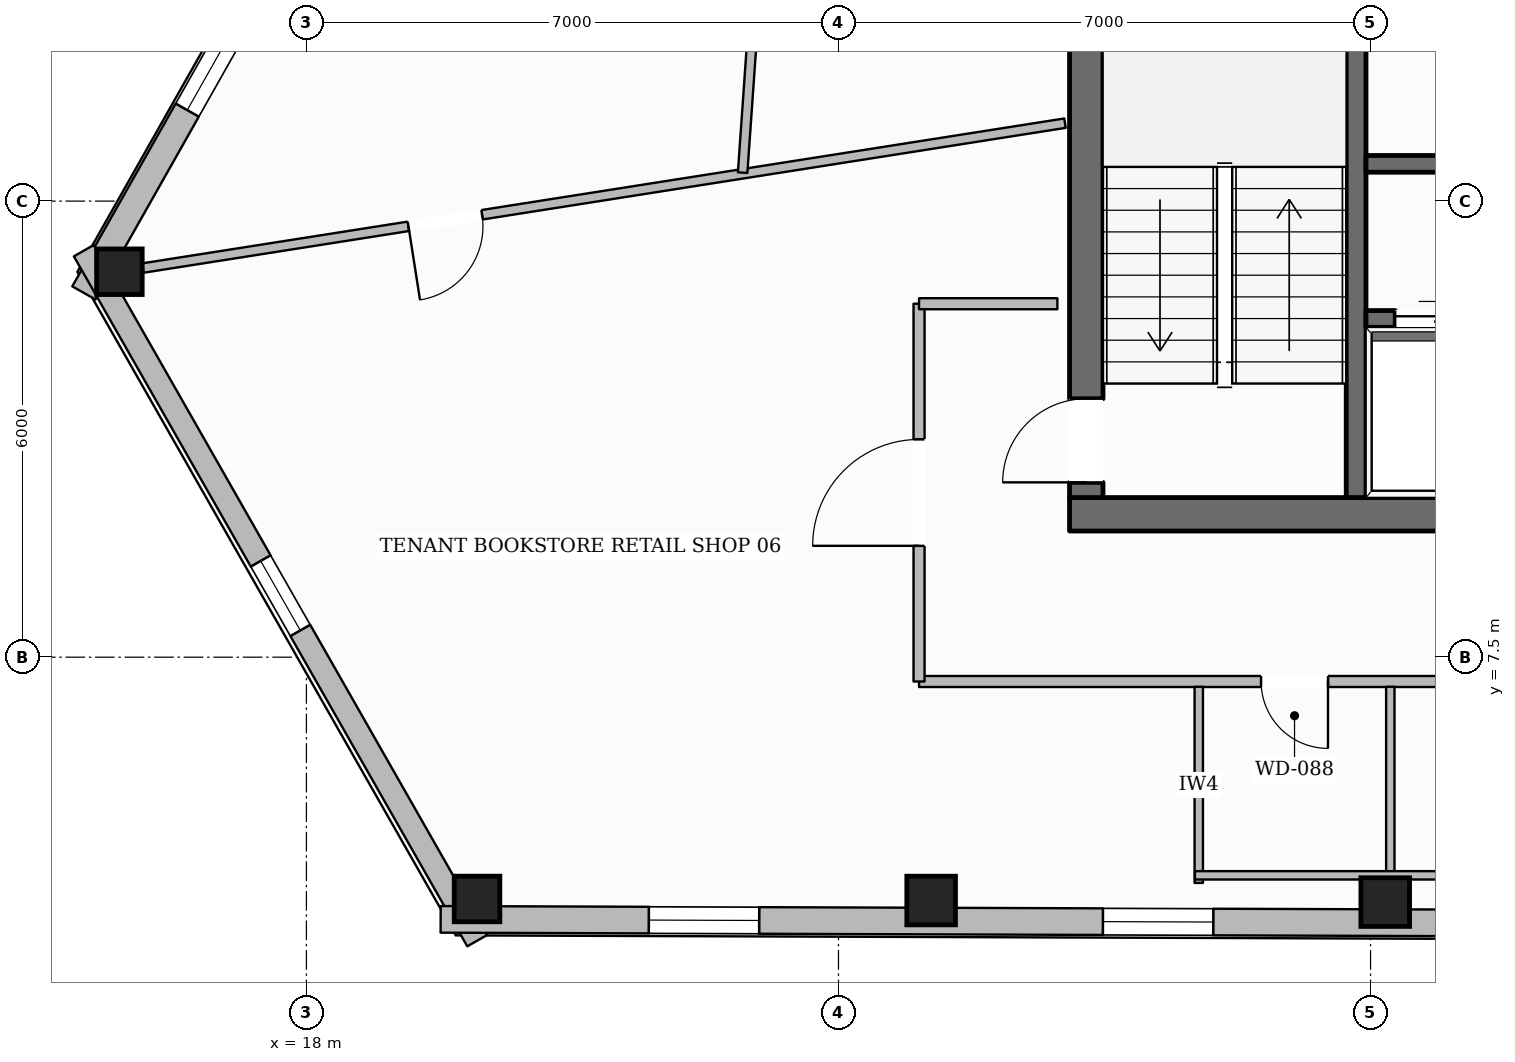
"""IFC4 building model, lengths in metres.
Left out: names, types, materials, properties, quantities, classifications, styles, units other than length and angle.
Written with IfcOpenShell. Run it as: python <this file> out.ifc"""

import sys

from ifc_helpers import new_model, si_unit, direction, frame, frame_2d, origin, origin_2d, place, context, subcontext, project, spatial, rectangle, hollow_rectangle, extrude, element, fill, save


model = new_model("IFC4")
c1 = context("Model", 3, precision=1e-05, world=origin(), true_north=direction((0.0, 1.0)))
c2 = subcontext(c1, "Body", "Model", "MODEL_VIEW")
j1 = project(units=[si_unit("LENGTHUNIT", "METRE"), si_unit("PLANEANGLEUNIT", "RADIAN")], contexts=[c1])
p1 = place(None, origin())
s1 = spatial("IfcSite", under=j1, at=p1, CompositionType="ELEMENT")
p2 = place(p1, origin())
s2 = spatial("IfcBuilding", under=s1, at=p2, CompositionType="ELEMENT")
p3 = place(p2, frame((0.0, 0.0, 168.85)))
s3 = spatial("IfcBuildingStorey", under=s2, at=p3, CompositionType="ELEMENT", Elevation=168.85)
p4 = place(p3, frame((28.04, 9.38, 0.0), z_axis=(0.0, 0.0, 1.0), x_axis=(1.0, 0.0, 0.0)))
e1 = element("IfcWall", 1, at=p4, inside=s3, PredefinedType="SOLIDWALL", context=c2, shape_type="SweptSolid", body=[
    extrude(rectangle(XDim=19.92, YDim=0.44, at=frame_2d((9.96, 0.0))), origin(), (0.0, 0.0, 1.0), 3.6),
])
p5 = place(p4, frame((10.46, 0.0, 0.0)))
e2 = element("IfcOpeningElement", 2, at=p5, cuts=e1, PredefinedType="OPENING", context=c2, shape_type="SweptSolid", body=[
    extrude(rectangle(XDim=1.4, YDim=2.2, at=frame_2d((0.7, 1.1))), frame((0.0, 0.23, 0.0), z_axis=(0.0, -1.0, 0.0), x_axis=(1.0, 0.0, 0.0)), (0.0, 0.0, 1.0), 0.46),
])
p6 = place(p3, frame((28.26, 9.6, 0.0), z_axis=(0.0, 0.0, 1.0), x_axis=(0.0, 1.0, 0.0)))
e3 = element("IfcWall", 3, at=p6, inside=s3, PredefinedType="SOLIDWALL", context=c2, shape_type="SweptSolid", body=[
    extrude(rectangle(XDim=13.0, YDim=0.44, at=frame_2d((6.5, 0.0))), origin(), (0.0, 0.0, 1.0), 3.6),
])
p7 = place(p6, frame((0.2, 0.0, 0.0)))
e4 = element("IfcOpeningElement", 4, at=p7, cuts=e3, PredefinedType="OPENING", context=c2, shape_type="SweptSolid", body=[
    extrude(rectangle(XDim=1.1, YDim=2.15, at=frame_2d((0.55, 1.075))), frame((0.0, 0.23, 0.0), z_axis=(0.0, -1.0, 0.0), x_axis=(1.0, 0.0, 0.0)), (0.0, 0.0, 1.0), 0.46),
])
p8 = place(p6, frame((8.4, 0.0, 0.0)))
e5 = element("IfcOpeningElement", 5, at=p8, cuts=e3, PredefinedType="OPENING", context=c2, shape_type="SweptSolid", body=[
    extrude(rectangle(XDim=0.9, YDim=2.1, at=frame_2d((0.45, 1.05))), frame((0.0, 0.23, 0.0), z_axis=(0.0, -1.0, 0.0), x_axis=(1.0, 0.0, 0.0)), (0.0, 0.0, 1.0), 0.46),
])
p9 = place(p3, frame((31.81, 9.6, 0.0), z_axis=(0.0, 0.0, 1.0), x_axis=(0.0, 1.0, 0.0)))
e6 = element("IfcWall", 6, at=p9, inside=s3, PredefinedType="SHEAR", context=c2, shape_type="SweptSolid", body=[
    extrude(rectangle(XDim=13.0, YDim=0.26, at=frame_2d((6.5, 0.0))), origin(), (0.0, 0.0, 1.0), 3.6),
])
p10 = place(p9, frame((10.925, 0.0, 0.0)))
e7 = element("IfcOpeningElement", 7, at=p10, cuts=e6, PredefinedType="OPENING", context=c2, shape_type="SweptSolid", body=[
    extrude(rectangle(XDim=1.25, YDim=2.25, at=frame_2d((0.625, 1.125))), frame((0.0, 0.14, 0.0), z_axis=(0.0, -1.0, 0.0), x_axis=(1.0, 0.0, 0.0)), (0.0, 0.0, 1.0), 0.28),
])
p11 = place(p3, frame((31.94, 13.99, 0.0), z_axis=(0.0, 0.0, 1.0), x_axis=(1.0, 0.0, 0.0)))
e8 = element("IfcWall", 8, at=p11, inside=s3, PredefinedType="SOLIDWALL", context=c2, shape_type="SweptSolid", body=[
    extrude(rectangle(XDim=12.12, YDim=0.22, at=frame_2d((6.06, 0.0))), origin(), (0.0, 0.0, 1.0), 3.6),
])
p12 = place(p11, frame((1.91, 0.0, 0.0)))
e9 = element("IfcOpeningElement", 9, at=p12, cuts=e8, PredefinedType="OPENING", context=c2, shape_type="SweptSolid", body=[
    extrude(rectangle(XDim=0.9, YDim=2.1, at=frame_2d((0.45, 1.05))), frame((0.0, 0.12, 0.0), z_axis=(0.0, -1.0, 0.0), x_axis=(1.0, 0.0, 0.0)), (0.0, 0.0, 1.0), 0.24),
])
p13 = place(p11, frame((7.95, 0.0, 0.0)))
e10 = element("IfcOpeningElement", 10, at=p13, cuts=e8, PredefinedType="OPENING", context=c2, shape_type="SweptSolid", body=[
    extrude(rectangle(XDim=1.02, YDim=2.15, at=frame_2d((0.51, 1.075))), frame((0.0, 0.12, 0.0), z_axis=(0.0, -1.0, 0.0), x_axis=(1.0, 0.0, 0.0)), (0.0, 0.0, 1.0), 0.24),
])
p14 = place(p3, frame((31.94, 11.95, 0.0), z_axis=(0.0, 0.0, 1.0), x_axis=(1.0, 0.0, 0.0)))
e11 = element("IfcWall", 11, at=p14, inside=s3, PredefinedType="SOLIDWALL", context=c2, shape_type="SweptSolid", body=[
    extrude(rectangle(XDim=6.19, YDim=0.22, at=frame_2d((3.095, 0.0))), origin(), (0.0, 0.0, 1.0), 3.6),
])
p15 = place(p14, frame((0.385, 0.0, 0.0)))
e12 = element("IfcOpeningElement", 12, at=p15, cuts=e11, PredefinedType="OPENING", context=c2, shape_type="SweptSolid", body=[
    extrude(rectangle(XDim=1.1, YDim=2.2, at=frame_2d((0.55, 1.1))), frame((0.0, 0.12, 0.0), z_axis=(0.0, -1.0, 0.0), x_axis=(1.0, 0.0, 0.0)), (0.0, 0.0, 1.0), 0.24),
])
p16 = place(p14, frame((2.435, 0.0, 0.0)))
e13 = element("IfcOpeningElement", 13, at=p16, cuts=e11, PredefinedType="OPENING", context=c2, shape_type="SweptSolid", body=[
    extrude(rectangle(XDim=1.1, YDim=2.2, at=frame_2d((0.55, 1.1))), frame((0.0, 0.12, 0.0), z_axis=(0.0, -1.0, 0.0), x_axis=(1.0, 0.0, 0.0)), (0.0, 0.0, 1.0), 0.24),
])
p17 = place(p14, frame((4.485, 0.0, 0.0)))
e14 = element("IfcOpeningElement", 14, at=p17, cuts=e11, PredefinedType="OPENING", context=c2, shape_type="SweptSolid", body=[
    extrude(rectangle(XDim=1.1, YDim=2.2, at=frame_2d((0.55, 1.1))), frame((0.0, 0.12, 0.0), z_axis=(0.0, -1.0, 0.0), x_axis=(1.0, 0.0, 0.0)), (0.0, 0.0, 1.0), 0.24),
])
for number, where, z_axis, x_axis in (
    (15, (15.54, 12.571, 0.0), (0.0, 0.0, 1.0), (1.0, 0.0, 0.0)),
    (16, (20.245, 4.319, 0.0), (0.0, 0.0, 1.0), (1.0, 0.0, 0.0)),
):
    element("IfcColumn", number, at=place(p3, frame(where, z_axis=z_axis, x_axis=x_axis)), inside=s3, PredefinedType="COLUMN", context=c2, shape_type="SweptSolid", body=[
        extrude(hollow_rectangle(XDim=0.6, YDim=0.6, WallThickness=0.028, at=origin_2d()), origin(), (0.0, 0.0, 1.0), 3.6),
    ])
for number, where, z_axis, x_axis in (
    (17, (26.219, 4.299, 0.0), (0.0, 0.0, 1.0), (1.0, 0.0, 0.0)),
    (18, (32.193, 4.278, 0.0), (0.0, 0.0, 1.0), (1.0, 0.0, 0.0)),
):
    element("IfcColumn", number, at=place(p3, frame(where, z_axis=z_axis, x_axis=x_axis)), inside=s3, PredefinedType="COLUMN", context=c2, shape_type="SweptSolid", body=[
        extrude(hollow_rectangle(XDim=0.64, YDim=0.64, WallThickness=0.028, at=origin_2d()), origin(), (0.0, 0.0, 1.0), 3.6),
    ])
p18 = place(p3, frame((15.072, 12.292, 0.0), z_axis=(0.0, 0.0, 1.0), x_axis=(0.492336574501, 0.870404904288, 0.0)))
e19 = element("IfcWall", 19, at=p18, inside=s3, PredefinedType="STANDARD", context=c2, shape_type="SweptSolid", body=[
    extrude(rectangle(XDim=37.15, YDim=0.35, at=frame_2d((18.575, 0.0))), origin(), (0.0, 0.0, 1.0), 3.132),
])
p19 = place(p18, frame((8.888, 0.0, 0.0)))
e20 = element("IfcOpeningElement", 20, at=p19, cuts=e19, PredefinedType="OPENING", context=c2, shape_type="SweptSolid", body=[
    extrude(rectangle(XDim=1.0, YDim=2.2, at=frame_2d((0.5, 1.1))), frame((0.0, 0.185, 0.0), z_axis=(0.0, -1.0, 0.0), x_axis=(1.0, 0.0, 0.0)), (0.0, 0.0, 1.0), 0.37),
])
p20 = place(p18, frame((32.928, 0.0, 0.65)))
e21 = element("IfcOpeningElement", 21, at=p20, cuts=e19, PredefinedType="OPENING", context=c2, shape_type="SweptSolid", body=[
    extrude(rectangle(XDim=1.45, YDim=1.75, at=frame_2d((0.725, 0.875))), frame((0.0, 0.185, 0.0), z_axis=(0.0, -1.0, 0.0), x_axis=(1.0, 0.0, 0.0)), (0.0, 0.0, 1.0), 0.37),
])
p21 = place(p18, frame((26.895, 0.0, 0.65)))
e22 = element("IfcOpeningElement", 22, at=p21, cuts=e19, PredefinedType="OPENING", context=c2, shape_type="SweptSolid", body=[
    extrude(rectangle(XDim=1.45, YDim=1.75, at=frame_2d((0.725, 0.875))), frame((0.0, 0.185, 0.0), z_axis=(0.0, -1.0, 0.0), x_axis=(1.0, 0.0, 0.0)), (0.0, 0.0, 1.0), 0.37),
])
p22 = place(p18, frame((20.862, 0.0, 0.65)))
e23 = element("IfcOpeningElement", 23, at=p22, cuts=e19, PredefinedType="OPENING", context=c2, shape_type="SweptSolid", body=[
    extrude(rectangle(XDim=1.45, YDim=1.75, at=frame_2d((0.725, 0.875))), frame((0.0, 0.185, 0.0), z_axis=(0.0, -1.0, 0.0), x_axis=(1.0, 0.0, 0.0)), (0.0, 0.0, 1.0), 0.37),
])
p23 = place(p18, frame((2.764, 0.0, 0.65)))
e24 = element("IfcOpeningElement", 24, at=p23, cuts=e19, PredefinedType="OPENING", context=c2, shape_type="SweptSolid", body=[
    extrude(rectangle(XDim=1.45, YDim=1.75, at=frame_2d((0.725, 0.875))), frame((0.0, 0.185, 0.0), z_axis=(0.0, -1.0, 0.0), x_axis=(1.0, 0.0, 0.0)), (0.0, 0.0, 1.0), 0.37),
])
p24 = place(p3, frame((20.247, 3.77, 0.0), z_axis=(0.0, 0.0, 1.0), x_axis=(-0.495323484774, 0.868708607895, 0.0)))
e25 = element("IfcWall", 25, at=p24, inside=s3, PredefinedType="STANDARD", context=c2, shape_type="SweptSolid", body=[
    extrude(rectangle(XDim=10.449, YDim=0.3, at=frame_2d((5.225, 0.0))), origin(), (0.0, 0.0, 1.0), 3.132),
])
p25 = place(p24, frame((4.7, 0.0, 0.65)))
e26 = element("IfcOpeningElement", 26, at=p25, cuts=e25, PredefinedType="OPENING", context=c2, shape_type="SweptSolid", body=[
    extrude(rectangle(XDim=1.05, YDim=1.7, at=frame_2d((0.525, 0.85))), frame((0.0, 0.16, 0.0), z_axis=(0.0, -1.0, 0.0), x_axis=(1.0, 0.0, 0.0)), (0.0, 0.0, 1.0), 0.32),
])
p26 = place(p3, frame((56.57, 3.924, 0.0), z_axis=(0.0, 0.0, 1.0), x_axis=(-0.999994073586, 0.003442788504, 0.0)))
e27 = element("IfcWall", 27, at=p26, inside=s3, PredefinedType="STANDARD", context=c2, shape_type="SweptSolid", body=[
    extrude(rectangle(XDim=36.804, YDim=0.35, at=frame_2d((18.402, 0.0))), origin(), (0.0, 0.0, 1.0), 3.132),
])
p27 = place(p26, frame((8.801, 0.0, 0.0)))
e28 = element("IfcOpeningElement", 28, at=p27, cuts=e27, PredefinedType="OPENING", context=c2, shape_type="SweptSolid", body=[
    extrude(rectangle(XDim=1.0, YDim=2.2, at=frame_2d((0.5, 1.1))), frame((0.0, 0.185, 0.0), z_axis=(0.0, -1.0, 0.0), x_axis=(1.0, 0.0, 0.0)), (0.0, 0.0, 1.0), 0.37),
])
p28 = place(p26, frame((32.614, 0.0, 0.65)))
e29 = element("IfcOpeningElement", 29, at=p28, cuts=e27, PredefinedType="OPENING", context=c2, shape_type="SweptSolid", body=[
    extrude(rectangle(XDim=1.45, YDim=1.75, at=frame_2d((0.725, 0.875))), frame((0.0, 0.185, 0.0), z_axis=(0.0, -1.0, 0.0), x_axis=(1.0, 0.0, 0.0)), (0.0, 0.0, 1.0), 0.37),
])
p29 = place(p26, frame((26.64, 0.0, 0.65)))
e30 = element("IfcOpeningElement", 30, at=p29, cuts=e27, PredefinedType="OPENING", context=c2, shape_type="SweptSolid", body=[
    extrude(rectangle(XDim=1.45, YDim=1.75, at=frame_2d((0.725, 0.875))), frame((0.0, 0.185, 0.0), z_axis=(0.0, -1.0, 0.0), x_axis=(1.0, 0.0, 0.0)), (0.0, 0.0, 1.0), 0.37),
])
p30 = place(p26, frame((20.666, 0.0, 0.65)))
e31 = element("IfcOpeningElement", 31, at=p30, cuts=e27, PredefinedType="OPENING", context=c2, shape_type="SweptSolid", body=[
    extrude(rectangle(XDim=1.45, YDim=1.75, at=frame_2d((0.725, 0.875))), frame((0.0, 0.185, 0.0), z_axis=(0.0, -1.0, 0.0), x_axis=(1.0, 0.0, 0.0)), (0.0, 0.0, 1.0), 0.37),
])
p31 = place(p26, frame((2.743, 0.0, 0.65)))
e32 = element("IfcOpeningElement", 32, at=p31, cuts=e27, PredefinedType="OPENING", context=c2, shape_type="SweptSolid", body=[
    extrude(rectangle(XDim=1.45, YDim=1.75, at=frame_2d((0.725, 0.875))), frame((0.0, 0.185, 0.0), z_axis=(0.0, -1.0, 0.0), x_axis=(1.0, 0.0, 0.0)), (0.0, 0.0, 1.0), 0.37),
])
p32 = place(p3, frame((49.94, 7.18, 0.0), z_axis=(0.0, 0.0, 1.0), x_axis=(-1.0, 0.0, 0.0)))
e33 = element("IfcWall", 33, at=p32, inside=s3, PredefinedType="PARTITIONING", context=c2, shape_type="SweptSolid", body=[
    extrude(rectangle(XDim=23.88, YDim=0.145, at=frame_2d((11.94, 0.0))), origin(), (0.0, 0.0, 1.0), 3.6),
])
p33 = place(p32, frame((18.5, 0.0, 0.0)))
e34 = element("IfcOpeningElement", 34, at=p33, cuts=e33, PredefinedType="OPENING", context=c2, shape_type="SweptSolid", body=[
    extrude(rectangle(XDim=0.88, YDim=2.1, at=frame_2d((0.44, 1.05))), frame((0.0, 0.083, 0.0), z_axis=(0.0, -1.0, 0.0), x_axis=(1.0, 0.0, 0.0)), (0.0, 0.0, 1.0), 0.165),
])
p34 = place(p32, frame((15.98, 0.0, 0.0)))
e35 = element("IfcOpeningElement", 35, at=p34, cuts=e33, PredefinedType="OPENING", context=c2, shape_type="SweptSolid", body=[
    extrude(rectangle(XDim=0.88, YDim=2.1, at=frame_2d((0.44, 1.05))), frame((0.0, 0.083, 0.0), z_axis=(0.0, -1.0, 0.0), x_axis=(1.0, 0.0, 0.0)), (0.0, 0.0, 1.0), 0.165),
])
p35 = place(p32, frame((13.52, 0.0, 0.0)))
e36 = element("IfcOpeningElement", 36, at=p35, cuts=e33, PredefinedType="OPENING", context=c2, shape_type="SweptSolid", body=[
    extrude(rectangle(XDim=0.96, YDim=2.1, at=frame_2d((0.48, 1.05))), frame((0.0, 0.083, 0.0), z_axis=(0.0, -1.0, 0.0), x_axis=(1.0, 0.0, 0.0)), (0.0, 0.0, 1.0), 0.165),
])
p36 = place(p32, frame((6.021, 0.0, 0.0)))
e37 = element("IfcOpeningElement", 37, at=p36, cuts=e33, PredefinedType="OPENING", context=c2, shape_type="SweptSolid", body=[
    extrude(rectangle(XDim=0.98, YDim=2.15, at=frame_2d((0.49, 1.075))), frame((0.0, 0.083, 0.0), z_axis=(0.0, -1.0, 0.0), x_axis=(1.0, 0.0, 0.0)), (0.0, 0.0, 1.0), 0.165),
])
p37 = place(p3, frame((26.06, 7.18, 0.0), z_axis=(0.0, 0.0, 1.0), x_axis=(0.0, 1.0, 0.0)))
e38 = element("IfcWall", 38, at=p37, inside=s3, PredefinedType="PARTITIONING", context=c2, shape_type="SweptSolid", body=[
    extrude(rectangle(XDim=4.97, YDim=0.145, at=frame_2d((2.485, 0.0))), origin(), (0.0, 0.0, 1.0), 3.6),
])
p38 = place(p37, frame((1.785, 0.0, 0.0)))
e39 = element("IfcOpeningElement", 39, at=p38, cuts=e38, PredefinedType="OPENING", context=c2, shape_type="SweptSolid", body=[
    extrude(rectangle(XDim=1.4, YDim=2.2, at=frame_2d((0.7, 1.1))), frame((0.0, 0.083, 0.0), z_axis=(0.0, -1.0, 0.0), x_axis=(1.0, 0.0, 0.0)), (0.0, 0.0, 1.0), 0.165),
])
p39 = place(p3, frame((26.06, 12.15, 0.0), z_axis=(0.0, 0.0, 1.0), x_axis=(1.0, 0.0, 0.0)))
e40 = element("IfcWall", 40, at=p39, inside=s3, PredefinedType="PARTITIONING", context=c2, shape_type="SweptSolid", body=[
    extrude(rectangle(XDim=1.82, YDim=0.145, at=frame_2d((0.91, 0.0))), origin(), (0.0, 0.0, 1.0), 3.6),
])
p40 = place(p3, frame((29.74, 4.53, 0.0), z_axis=(0.0, 0.0, 1.0), x_axis=(0.0, 1.0, 0.0)))
e41 = element("IfcWall", 41, at=p40, inside=s3, PredefinedType="PLUMBINGWALL", context=c2, shape_type="SweptSolid", body=[
    extrude(rectangle(XDim=2.58, YDim=0.11, at=frame_2d((1.29, 0.0))), origin(), (0.0, 0.0, 1.0), 3.6),
])
p41 = place(p3, frame((32.26, 4.53, 0.0), z_axis=(0.0, 0.0, 1.0), x_axis=(0.0, 1.0, 0.0)))
e42 = element("IfcWall", 42, at=p41, inside=s3, PredefinedType="PLUMBINGWALL", context=c2, shape_type="SweptSolid", body=[
    extrude(rectangle(XDim=2.58, YDim=0.11, at=frame_2d((1.29, 0.0))), origin(), (0.0, 0.0, 1.0), 3.141),
])
p42 = place(p3, frame((29.69, 4.63, 0.0), z_axis=(0.0, 0.0, 1.0), x_axis=(1.0, 0.0, 0.0)))
e43 = element("IfcWall", 43, at=p42, inside=s3, PredefinedType="PLUMBINGWALL", context=c2, shape_type="SweptSolid", body=[
    extrude(rectangle(XDim=7.46, YDim=0.11, at=frame_2d((3.73, 0.0))), origin(), (0.0, 0.0, 1.0), 3.6),
])
p43 = place(p3, frame((27.98, 14.525, 0.0), z_axis=(0.0, 0.0, 1.0), x_axis=(-0.987880348001, -0.155217325174, 0.0)))
e44 = element("IfcWall", 44, at=p43, inside=s3, PredefinedType="PARTITIONING", context=c2, shape_type="SweptSolid", body=[
    extrude(rectangle(XDim=12.281, YDim=0.125, at=frame_2d((6.141, 0.0))), origin(), (0.0, 0.0, 1.0), 3.141),
])
p44 = place(p43, frame((7.763, 0.0, 0.0)))
e45 = element("IfcOpeningElement", 45, at=p44, cuts=e44, PredefinedType="OPENING", context=c2, shape_type="SweptSolid", body=[
    extrude(rectangle(XDim=0.98, YDim=2.15, at=frame_2d((0.49, 1.075))), frame((0.0, 0.073, 0.0), z_axis=(0.0, -1.0, 0.0), x_axis=(1.0, 0.0, 0.0)), (0.0, 0.0, 1.0), 0.145),
])
p45 = place(p3, frame((24.3, 21.866, 0.0), z_axis=(0.0, 0.0, 1.0), x_axis=(-0.070058077284, -0.997542914268, 0.0)))
e46 = element("IfcWall", 46, at=p45, inside=s3, PredefinedType="PARTITIONING", context=c2, shape_type="SweptSolid", body=[
    extrude(rectangle(XDim=8.012, YDim=0.125, at=frame_2d((4.006, 0.0))), origin(), (0.0, 0.0, 1.0), 3.339),
])
p46 = place(p23, origin())
e47 = element("IfcWindow", 47, at=p46, inside=s3, PartitioningType="SINGLE_PANEL", PredefinedType="WINDOW", context=c2, shape_type="SweptSolid", body=[
    extrude(rectangle(XDim=1.45, YDim=1.75, at=frame_2d((0.725, 0.875))), frame((0.0, 0.03, 0.0), z_axis=(0.0, -1.0, 0.0), x_axis=(1.0, 0.0, 0.0)), (0.0, 0.0, 1.0), 0.06),
])
fill(e24, e47)
p47 = place(p28, origin())
e48 = element("IfcWindow", 48, at=p47, inside=s3, PartitioningType="SINGLE_PANEL", PredefinedType="WINDOW", context=c2, shape_type="SweptSolid", body=[
    extrude(rectangle(XDim=1.45, YDim=1.75, at=frame_2d((0.725, 0.875))), frame((0.0, 0.03, 0.0), z_axis=(0.0, -1.0, 0.0), x_axis=(1.0, 0.0, 0.0)), (0.0, 0.0, 1.0), 0.06),
])
fill(e29, e48)
p48 = place(p29, origin())
e49 = element("IfcWindow", 49, at=p48, inside=s3, PartitioningType="SINGLE_PANEL", PredefinedType="WINDOW", context=c2, shape_type="SweptSolid", body=[
    extrude(rectangle(XDim=1.45, YDim=1.75, at=frame_2d((0.725, 0.875))), frame((0.0, 0.03, 0.0), z_axis=(0.0, -1.0, 0.0), x_axis=(1.0, 0.0, 0.0)), (0.0, 0.0, 1.0), 0.06),
])
fill(e30, e49)
p49 = place(p25, origin())
e50 = element("IfcWindow", 50, at=p49, inside=s3, PartitioningType="SINGLE_PANEL", PredefinedType="WINDOW", context=c2, shape_type="SweptSolid", body=[
    extrude(rectangle(XDim=1.05, YDim=1.7, at=frame_2d((0.525, 0.85))), frame((0.0, 0.03, 0.0), z_axis=(0.0, -1.0, 0.0), x_axis=(1.0, 0.0, 0.0)), (0.0, 0.0, 1.0), 0.06),
])
fill(e26, e50)
p50 = place(p7, origin())
e51 = element("IfcDoor", 51, at=p50, inside=s3, OperationType="SINGLE_SWING_LEFT", PredefinedType="DOOR", context=c2, shape_type="SweptSolid", body=[
    extrude(rectangle(XDim=1.1, YDim=2.15, at=frame_2d((0.55, 1.075))), frame((0.0, 0.025, 0.0), z_axis=(0.0, -1.0, 0.0), x_axis=(1.0, 0.0, 0.0)), (0.0, 0.0, 1.0), 0.05),
])
fill(e4, e51)
p51 = place(p15, origin())
e52 = element("IfcDoor", 52, at=p51, inside=s3, OperationType="DOUBLE_DOOR_SLIDING", PredefinedType="DOOR", context=c2, shape_type="SweptSolid", body=[
    extrude(rectangle(XDim=1.1, YDim=2.2, at=frame_2d((0.55, 1.1))), frame((0.0, 0.025, 0.0), z_axis=(0.0, -1.0, 0.0), x_axis=(1.0, 0.0, 0.0)), (0.0, 0.0, 1.0), 0.05),
])
fill(e12, e52)
p52 = place(p33, origin())
e53 = element("IfcDoor", 53, at=p52, inside=s3, OperationType="SINGLE_SWING_LEFT", PredefinedType="DOOR", context=c2, shape_type="SweptSolid", body=[
    extrude(rectangle(XDim=0.88, YDim=2.1, at=frame_2d((0.44, 1.05))), frame((0.0, 0.025, 0.0), z_axis=(0.0, -1.0, 0.0), x_axis=(1.0, 0.0, 0.0)), (0.0, 0.0, 1.0), 0.05),
])
fill(e34, e53)
p53 = place(p44, origin())
e54 = element("IfcDoor", 54, at=p53, inside=s3, OperationType="SINGLE_SWING_RIGHT", PredefinedType="DOOR", context=c2, shape_type="SweptSolid", body=[
    extrude(rectangle(XDim=0.98, YDim=2.15, at=frame_2d((0.49, 1.075))), frame((0.0, 0.025, 0.0), z_axis=(0.0, -1.0, 0.0), x_axis=(1.0, 0.0, 0.0)), (0.0, 0.0, 1.0), 0.05),
])
fill(e45, e54)
p54 = place(p38, origin())
e55 = element("IfcDoor", 55, at=p54, inside=s3, OperationType="SINGLE_SWING_LEFT", PredefinedType="DOOR", context=c2, shape_type="SweptSolid", body=[
    extrude(rectangle(XDim=1.4, YDim=2.2, at=frame_2d((0.7, 1.1))), frame((0.0, 0.025, 0.0), z_axis=(0.0, -1.0, 0.0), x_axis=(1.0, 0.0, 0.0)), (0.0, 0.0, 1.0), 0.05),
])
fill(e39, e55)
save(model, sys.argv[1])
